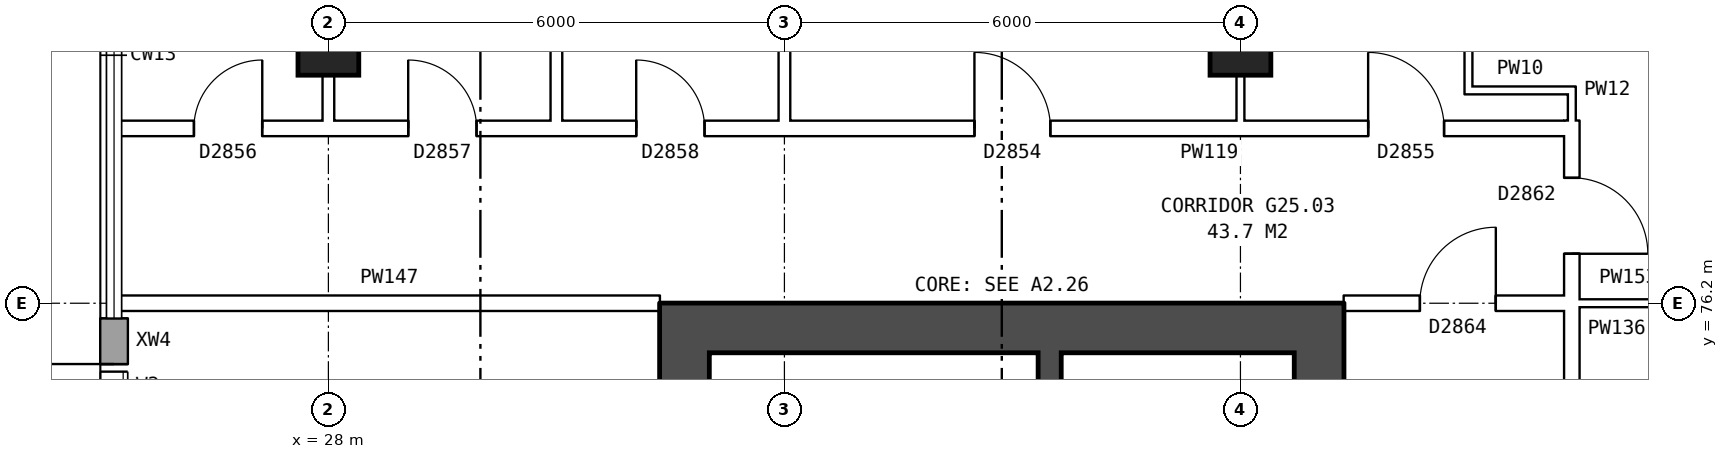
"""IFC4 building model, lengths in metres.
Left out: names, types, materials, properties, quantities, classifications, styles, units other than length and angle.
Written with IfcOpenShell. Run it as: python <this file> out.ifc"""

import sys

from ifc_helpers import new_model, si_unit, direction, frame, frame_2d, origin, origin_2d, place, context, subcontext, project, spatial, rectangle, extrude, element, fill, save


model = new_model("IFC4")
c1 = context("Model", 3, precision=1e-05, world=origin(), true_north=direction((0.0, 1.0)))
c2 = subcontext(c1, "Body", "Model", "MODEL_VIEW")
j1 = project(units=[si_unit("LENGTHUNIT", "METRE"), si_unit("PLANEANGLEUNIT", "RADIAN")], contexts=[c1])
p1 = place(None, origin())
s1 = spatial("IfcSite", under=j1, at=p1, CompositionType="ELEMENT")
p2 = place(p1, origin())
s2 = spatial("IfcBuilding", under=s1, at=p2, CompositionType="ELEMENT")
p3 = place(p2, frame((0.0, 0.0, 90.2)))
s3 = spatial("IfcBuildingStorey", under=s2, at=p3, CompositionType="ELEMENT", Elevation=90.2)
for number, where, z_axis, x_axis in (
    (1, (28.0, 79.6, 0.0), (0.0, 0.0, 1.0), (1.0, 0.0, 0.0)),
    (2, (40.0, 79.6, 0.0), (0.0, 0.0, 1.0), (1.0, 0.0, 0.0)),
):
    element("IfcColumn", number, at=place(p3, frame(where, z_axis=z_axis, x_axis=x_axis)), inside=s3, PredefinedType="COLUMN", context=c2, shape_type="SweptSolid", body=[
        extrude(rectangle(XDim=0.8, YDim=0.8, at=origin_2d()), origin(), (0.0, 0.0, 1.0), 5.6),
    ])
p4 = place(p3, frame((25.18, 76.0, 0.0), z_axis=(0.0, 0.0, 1.0), x_axis=(0.0, -1.0, 0.0)))
e3 = element("IfcWall", 3, at=p4, inside=s3, PredefinedType="STANDARD", context=c2, shape_type="SweptSolid", body=[
    extrude(rectangle(XDim=3.0, YDim=0.36, at=frame_2d((1.5, 0.0))), origin(), (0.0, 0.0, 1.0), 5.6),
])
p5 = place(p4, frame((0.7, 0.0, 3.4)))
e4 = element("IfcOpeningElement", 4, at=p5, cuts=e3, PredefinedType="OPENING", context=c2, shape_type="SweptSolid", body=[
    extrude(rectangle(XDim=1.6, YDim=1.2, at=frame_2d((0.8, 0.6))), frame((0.0, 0.19, 0.0), z_axis=(0.0, -1.0, 0.0), x_axis=(1.0, 0.0, 0.0)), (0.0, 0.0, 1.0), 0.38),
])
p6 = place(p4, frame((0.6, 0.0, 0.0)))
e5 = element("IfcOpeningElement", 5, at=p6, cuts=e3, PredefinedType="OPENING", context=c2, shape_type="SweptSolid", body=[
    extrude(rectangle(XDim=1.8, YDim=2.4, at=frame_2d((0.9, 1.2))), frame((0.0, 0.19, 0.0), z_axis=(0.0, -1.0, 0.0), x_axis=(1.0, 0.0, 0.0)), (0.0, 0.0, 1.0), 0.38),
])
p7 = place(p3, frame((41.035, 75.55, 0.0), z_axis=(0.0, 0.0, 1.0), x_axis=(0.0, -1.0, 0.0)))
e6 = element("IfcWall", 6, at=p7, inside=s3, PredefinedType="SHEAR", context=c2, shape_type="SweptSolid", body=[
    extrude(rectangle(XDim=11.1, YDim=0.65, at=frame_2d((5.55, 0.0))), origin(), (0.0, 0.0, 1.0), 5.6),
])
p8 = place(p7, frame((0.675, 0.0, 0.0)))
e7 = element("IfcOpeningElement", 7, at=p8, cuts=e6, PredefinedType="OPENING", context=c2, shape_type="SweptSolid", body=[
    extrude(rectangle(XDim=1.1, YDim=2.1, at=frame_2d((0.55, 1.05))), frame((0.0, 0.335, 0.0), z_axis=(0.0, -1.0, 0.0), x_axis=(1.0, 0.0, 0.0)), (0.0, 0.0, 1.0), 0.67),
])
p9 = place(p7, frame((2.95, 0.0, 0.0)))
e8 = element("IfcOpeningElement", 8, at=p9, cuts=e6, PredefinedType="OPENING", context=c2, shape_type="SweptSolid", body=[
    extrude(rectangle(XDim=1.1, YDim=2.1, at=frame_2d((0.55, 1.05))), frame((0.0, 0.335, 0.0), z_axis=(0.0, -1.0, 0.0), x_axis=(1.0, 0.0, 0.0)), (0.0, 0.0, 1.0), 0.67),
])
p10 = place(p7, frame((5.15, 0.0, 0.0)))
e9 = element("IfcOpeningElement", 9, at=p10, cuts=e6, PredefinedType="OPENING", context=c2, shape_type="SweptSolid", body=[
    extrude(rectangle(XDim=1.1, YDim=2.1, at=frame_2d((0.55, 1.05))), frame((0.0, 0.335, 0.0), z_axis=(0.0, -1.0, 0.0), x_axis=(1.0, 0.0, 0.0)), (0.0, 0.0, 1.0), 0.67),
])
p11 = place(p7, frame((7.35, 0.0, 0.0)))
e10 = element("IfcOpeningElement", 10, at=p11, cuts=e6, PredefinedType="OPENING", context=c2, shape_type="SweptSolid", body=[
    extrude(rectangle(XDim=1.1, YDim=2.1, at=frame_2d((0.55, 1.05))), frame((0.0, 0.335, 0.0), z_axis=(0.0, -1.0, 0.0), x_axis=(1.0, 0.0, 0.0)), (0.0, 0.0, 1.0), 0.67),
])
p12 = place(p7, frame((9.25, 0.0, 0.0)))
e11 = element("IfcOpeningElement", 11, at=p12, cuts=e6, PredefinedType="OPENING", context=c2, shape_type="SweptSolid", body=[
    extrude(rectangle(XDim=1.1, YDim=2.1, at=frame_2d((0.55, 1.05))), frame((0.0, 0.335, 0.0), z_axis=(0.0, -1.0, 0.0), x_axis=(1.0, 0.0, 0.0)), (0.0, 0.0, 1.0), 0.67),
])
p13 = place(p3, frame((32.685, 75.55, 0.0), z_axis=(0.0, 0.0, 1.0), x_axis=(0.0, -1.0, 0.0)))
e12 = element("IfcWall", 12, at=p13, inside=s3, PredefinedType="SHEAR", context=c2, shape_type="SweptSolid", body=[
    extrude(rectangle(XDim=11.1, YDim=0.65, at=frame_2d((5.55, 0.0))), origin(), (0.0, 0.0, 1.0), 5.6),
])
p14 = place(p3, frame((41.36, 75.875, 0.0), z_axis=(0.0, 0.0, 1.0), x_axis=(-1.0, 0.0, 0.0)))
e13 = element("IfcWall", 13, at=p14, inside=s3, PredefinedType="SHEAR", context=c2, shape_type="SweptSolid", body=[
    extrude(rectangle(XDim=9.0, YDim=0.65, at=frame_2d((4.5, 0.0))), origin(), (0.0, 0.0, 1.0), 5.6),
])
p15 = place(p3, frame((37.49, 75.55, 0.0), z_axis=(0.0, 0.0, 1.0), x_axis=(0.0, -1.0, 0.0)))
e14 = element("IfcWall", 14, at=p15, inside=s3, PredefinedType="SHEAR", context=c2, shape_type="SweptSolid", body=[
    extrude(rectangle(XDim=2.25, YDim=0.3, at=frame_2d((1.125, 0.0))), origin(), (0.0, 0.0, 1.0), 5.6),
])
p16 = place(p3, frame((44.36, 63.9, 0.0), z_axis=(0.0, 0.0, 1.0), x_axis=(0.0, 1.0, 0.0)))
e15 = element("IfcWall", 15, at=p16, inside=s3, PredefinedType="PARTITIONING", context=c2, shape_type="SweptSolid", body=[
    extrude(rectangle(XDim=12.2, YDim=0.2, at=frame_2d((6.1, 0.0))), origin(), (0.0, 0.0, 1.0), 5.6),
])
p17 = place(p16, frame((5.1, 0.0, 0.0)))
e16 = element("IfcOpeningElement", 16, at=p17, cuts=e15, PredefinedType="OPENING", context=c2, shape_type="SweptSolid", body=[
    extrude(rectangle(XDim=2.0, YDim=2.1, at=frame_2d((1.0, 1.05))), frame((0.0, 0.11, 0.0), z_axis=(0.0, -1.0, 0.0), x_axis=(1.0, 0.0, 0.0)), (0.0, 0.0, 1.0), 0.22),
])
p18 = place(p3, frame((25.24, 76.2, 0.0), z_axis=(0.0, 0.0, 1.0), x_axis=(1.0, 0.0, 0.0)))
e17 = element("IfcWall", 17, at=p18, inside=s3, PredefinedType="PARTITIONING", context=c2, shape_type="SweptSolid", body=[
    extrude(rectangle(XDim=7.12, YDim=0.2, at=frame_2d((3.56, 0.0))), origin(), (0.0, 0.0, 1.0), 5.6),
])
p19 = place(p3, frame((41.36, 76.2, 0.0), z_axis=(0.0, 0.0, 1.0), x_axis=(1.0, 0.0, 0.0)))
e18 = element("IfcWall", 18, at=p19, inside=s3, PredefinedType="PARTITIONING", context=c2, shape_type="SweptSolid", body=[
    extrude(rectangle(XDim=3.1, YDim=0.2, at=frame_2d((1.55, 0.0))), origin(), (0.0, 0.0, 1.0), 5.6),
])
p20 = place(p19, frame((1.0, 0.0, 0.0)))
e19 = element("IfcOpeningElement", 19, at=p20, cuts=e18, PredefinedType="OPENING", context=c2, shape_type="SweptSolid", body=[
    extrude(rectangle(XDim=1.0, YDim=2.1, at=frame_2d((0.5, 1.05))), frame((0.0, 0.11, 0.0), z_axis=(0.0, -1.0, 0.0), x_axis=(1.0, 0.0, 0.0)), (0.0, 0.0, 1.0), 0.22),
])
p21 = place(p3, frame((44.26, 76.2, 0.0), z_axis=(0.0, 0.0, 1.0), x_axis=(1.0, 0.0, 0.0)))
e20 = element("IfcWall", 20, at=p21, inside=s3, PredefinedType="PARTITIONING", context=c2, shape_type="SweptSolid", body=[
    extrude(rectangle(XDim=19.38, YDim=0.1, at=frame_2d((9.69, 0.0))), origin(), (0.0, 0.0, 1.0), 5.6),
])
p22 = place(p21, frame((4.42, 0.0, 0.0)))
e21 = element("IfcOpeningElement", 21, at=p22, cuts=e20, PredefinedType="OPENING", context=c2, shape_type="SweptSolid", body=[
    extrude(rectangle(XDim=1.0, YDim=2.1, at=frame_2d((0.5, 1.05))), frame((0.0, 0.06, 0.0), z_axis=(0.0, -1.0, 0.0), x_axis=(1.0, 0.0, 0.0)), (0.0, 0.0, 1.0), 0.12),
])
p23 = place(p21, frame((14.06, 0.0, 0.0)))
e22 = element("IfcOpeningElement", 22, at=p23, cuts=e20, PredefinedType="OPENING", context=c2, shape_type="SweptSolid", body=[
    extrude(rectangle(XDim=1.0, YDim=2.1, at=frame_2d((0.5, 1.05))), frame((0.0, 0.06, 0.0), z_axis=(0.0, -1.0, 0.0), x_axis=(1.0, 0.0, 0.0)), (0.0, 0.0, 1.0), 0.12),
])
p24 = place(p3, frame((25.24, 78.5, 0.0), z_axis=(0.0, 0.0, 1.0), x_axis=(1.0, 0.0, 0.0)))
e23 = element("IfcWall", 23, at=p24, inside=s3, PredefinedType="PARTITIONING", context=c2, shape_type="SweptSolid", body=[
    extrude(rectangle(XDim=19.22, YDim=0.2, at=frame_2d((9.61, 0.0))), origin(), (0.0, 0.0, 1.0), 5.6),
])
p25 = place(p24, frame((0.99, 0.0, 0.0)))
e24 = element("IfcOpeningElement", 24, at=p25, cuts=e23, PredefinedType="OPENING", context=c2, shape_type="SweptSolid", body=[
    extrude(rectangle(XDim=0.9, YDim=2.1, at=frame_2d((0.45, 1.05))), frame((0.0, 0.11, 0.0), z_axis=(0.0, -1.0, 0.0), x_axis=(1.0, 0.0, 0.0)), (0.0, 0.0, 1.0), 0.22),
])
p26 = place(p24, frame((3.81, 0.0, 0.0)))
e25 = element("IfcOpeningElement", 25, at=p26, cuts=e23, PredefinedType="OPENING", context=c2, shape_type="SweptSolid", body=[
    extrude(rectangle(XDim=0.9, YDim=2.1, at=frame_2d((0.45, 1.05))), frame((0.0, 0.11, 0.0), z_axis=(0.0, -1.0, 0.0), x_axis=(1.0, 0.0, 0.0)), (0.0, 0.0, 1.0), 0.22),
])
p27 = place(p24, frame((6.81, 0.0, 0.0)))
e26 = element("IfcOpeningElement", 26, at=p27, cuts=e23, PredefinedType="OPENING", context=c2, shape_type="SweptSolid", body=[
    extrude(rectangle(XDim=0.9, YDim=2.1, at=frame_2d((0.45, 1.05))), frame((0.0, 0.11, 0.0), z_axis=(0.0, -1.0, 0.0), x_axis=(1.0, 0.0, 0.0)), (0.0, 0.0, 1.0), 0.22),
])
p28 = place(p24, frame((11.26, 0.0, 0.0)))
e27 = element("IfcOpeningElement", 27, at=p28, cuts=e23, PredefinedType="OPENING", context=c2, shape_type="SweptSolid", body=[
    extrude(rectangle(XDim=1.0, YDim=2.1, at=frame_2d((0.5, 1.05))), frame((0.0, 0.11, 0.0), z_axis=(0.0, -1.0, 0.0), x_axis=(1.0, 0.0, 0.0)), (0.0, 0.0, 1.0), 0.22),
])
p29 = place(p24, frame((16.44, 0.0, 0.0)))
e28 = element("IfcOpeningElement", 28, at=p29, cuts=e23, PredefinedType="OPENING", context=c2, shape_type="SweptSolid", body=[
    extrude(rectangle(XDim=1.0, YDim=2.1, at=frame_2d((0.5, 1.05))), frame((0.0, 0.11, 0.0), z_axis=(0.0, -1.0, 0.0), x_axis=(1.0, 0.0, 0.0)), (0.0, 0.0, 1.0), 0.22),
])
p30 = place(p3, frame((42.95, 79.0, 0.0), z_axis=(0.0, 0.0, 1.0), x_axis=(1.0, 0.0, 0.0)))
e29 = element("IfcWall", 29, at=p30, inside=s3, PredefinedType="PARTITIONING", context=c2, shape_type="SweptSolid", body=[
    extrude(rectangle(XDim=1.46, YDim=0.1, at=frame_2d((0.73, 0.0))), origin(), (0.0, 0.0, 1.0), 5.6),
])
p31 = place(p3, frame((28.0, 78.4, 0.0), z_axis=(0.0, 0.0, 1.0), x_axis=(0.0, 1.0, 0.0)))
e30 = element("IfcWall", 30, at=p31, inside=s3, PredefinedType="PLUMBINGWALL", context=c2, shape_type="SweptSolid", body=[
    extrude(rectangle(XDim=7.211, YDim=0.15, at=frame_2d((3.605, 0.0))), origin(), (0.0, 0.0, 1.0), 5.6),
])
for number, where, z_axis, x_axis in (
    (31, (31.0, 78.4, 0.0), (0.0, 0.0, 1.0), (0.0, 1.0, 0.0)),
    (32, (34.0, 78.4, 0.0), (0.0, 0.0, 1.0), (0.0, 1.0, 0.0)),
):
    element("IfcWall", number, at=place(p3, frame(where, z_axis=z_axis, x_axis=x_axis)), inside=s3, PredefinedType="PLUMBINGWALL", context=c2, shape_type="SweptSolid", body=[
        extrude(rectangle(XDim=7.36, YDim=0.15, at=frame_2d((3.68, 0.0))), origin(), (0.0, 0.0, 1.0), 5.6),
    ])
p32 = place(p3, frame((40.0, 78.4, 0.0), z_axis=(0.0, 0.0, 1.0), x_axis=(0.0, 1.0, 0.0)))
e33 = element("IfcWall", 33, at=p32, inside=s3, PredefinedType="PARTITIONING", context=c2, shape_type="SweptSolid", body=[
    extrude(rectangle(XDim=7.36, YDim=0.1, at=frame_2d((3.68, 0.0))), origin(), (0.0, 0.0, 1.0), 5.6),
])
p33 = place(p3, frame((43.0, 78.95, 0.0), z_axis=(0.0, 0.0, 1.0), x_axis=(0.0, 1.0, 0.0)))
e34 = element("IfcWall", 34, at=p33, inside=s3, PredefinedType="PARTITIONING", context=c2, shape_type="SweptSolid", body=[
    extrude(rectangle(XDim=6.81, YDim=0.1, at=frame_2d((3.405, 0.0))), origin(), (0.0, 0.0, 1.0), 5.6),
])
p34 = place(p3, frame((44.36, 76.1, 0.0), z_axis=(0.0, 0.0, 1.0), x_axis=(0.0, 1.0, 0.0)))
e35 = element("IfcWall", 35, at=p34, inside=s3, PredefinedType="PARTITIONING", context=c2, shape_type="SweptSolid", body=[
    extrude(rectangle(XDim=2.502, YDim=0.2, at=frame_2d((1.251, 0.0))), origin(), (0.0, 0.0, 1.0), 5.6),
])
p35 = place(p34, frame((0.751, 0.0, 0.0)))
e36 = element("IfcOpeningElement", 36, at=p35, cuts=e35, PredefinedType="OPENING", context=c2, shape_type="SweptSolid", body=[
    extrude(rectangle(XDim=1.0, YDim=2.1, at=frame_2d((0.5, 1.05))), frame((0.0, 0.11, 0.0), z_axis=(0.0, -1.0, 0.0), x_axis=(1.0, 0.0, 0.0)), (0.0, 0.0, 1.0), 0.22),
])
p36 = place(p3, frame((44.36, 78.398, 0.0), z_axis=(0.0, 0.0, 1.0), x_axis=(0.0, 1.0, 0.0)))
e37 = element("IfcWall", 37, at=p36, inside=s3, PredefinedType="PARTITIONING", context=c2, shape_type="SweptSolid", body=[
    extrude(rectangle(XDim=0.652, YDim=0.1, at=frame_2d((0.326, 0.0))), origin(), (0.0, 0.0, 1.0), 5.6),
])
p37 = place(p5, origin())
e38 = element("IfcWindow", 38, at=p37, inside=s3, PartitioningType="DOUBLE_PANEL_HORIZONTAL", PredefinedType="WINDOW", context=c2, shape_type="SweptSolid", body=[
    extrude(rectangle(XDim=1.6, YDim=1.2, at=frame_2d((0.8, 0.6))), frame((0.0, 0.15, 0.0), z_axis=(0.0, -1.0, 0.0), x_axis=(1.0, 0.0, 0.0)), (0.0, 0.0, 1.0), 0.06),
])
fill(e4, e38)
p38 = place(p6, frame((1.8, 0.0, 0.0), z_axis=(0.0, 0.0, 1.0), x_axis=(-1.0, 0.0, 0.0)))
e39 = element("IfcDoor", 39, at=p38, inside=s3, OperationType="DOUBLE_DOOR_SINGLE_SWING", PredefinedType="DOOR", context=c2, shape_type="SweptSolid", body=[
    extrude(rectangle(XDim=1.8, YDim=2.4, at=frame_2d((0.9, 1.2))), frame((0.0, 0.025, 0.0), z_axis=(0.0, -1.0, 0.0), x_axis=(1.0, 0.0, 0.0)), (0.0, 0.0, 1.0), 0.05),
])
fill(e5, e39)
p39 = place(p20, origin())
e40 = element("IfcDoor", 40, at=p39, inside=s3, OperationType="SINGLE_SWING_RIGHT", PredefinedType="DOOR", context=c2, shape_type="SweptSolid", body=[
    extrude(rectangle(XDim=1.0, YDim=2.1, at=frame_2d((0.5, 1.05))), frame((0.0, 0.025, 0.0), z_axis=(0.0, -1.0, 0.0), x_axis=(1.0, 0.0, 0.0)), (0.0, 0.0, 1.0), 0.05),
])
fill(e19, e40)
p40 = place(p25, origin())
e41 = element("IfcDoor", 41, at=p40, inside=s3, OperationType="SINGLE_SWING_RIGHT", PredefinedType="DOOR", context=c2, shape_type="SweptSolid", body=[
    extrude(rectangle(XDim=0.9, YDim=2.1, at=frame_2d((0.45, 1.05))), frame((0.0, 0.025, 0.0), z_axis=(0.0, -1.0, 0.0), x_axis=(1.0, 0.0, 0.0)), (0.0, 0.0, 1.0), 0.05),
])
fill(e24, e41)
p41 = place(p26, origin())
e42 = element("IfcDoor", 42, at=p41, inside=s3, OperationType="SINGLE_SWING_LEFT", PredefinedType="DOOR", context=c2, shape_type="SweptSolid", body=[
    extrude(rectangle(XDim=0.9, YDim=2.1, at=frame_2d((0.45, 1.05))), frame((0.0, 0.025, 0.0), z_axis=(0.0, -1.0, 0.0), x_axis=(1.0, 0.0, 0.0)), (0.0, 0.0, 1.0), 0.05),
])
fill(e25, e42)
p42 = place(p27, origin())
e43 = element("IfcDoor", 43, at=p42, inside=s3, OperationType="SINGLE_SWING_LEFT", PredefinedType="DOOR", context=c2, shape_type="SweptSolid", body=[
    extrude(rectangle(XDim=0.9, YDim=2.1, at=frame_2d((0.45, 1.05))), frame((0.0, 0.025, 0.0), z_axis=(0.0, -1.0, 0.0), x_axis=(1.0, 0.0, 0.0)), (0.0, 0.0, 1.0), 0.05),
])
fill(e26, e43)
p43 = place(p28, origin())
e44 = element("IfcDoor", 44, at=p43, inside=s3, OperationType="SINGLE_SWING_LEFT", PredefinedType="DOOR", context=c2, shape_type="SweptSolid", body=[
    extrude(rectangle(XDim=1.0, YDim=2.1, at=frame_2d((0.5, 1.05))), frame((0.0, 0.025, 0.0), z_axis=(0.0, -1.0, 0.0), x_axis=(1.0, 0.0, 0.0)), (0.0, 0.0, 1.0), 0.05),
])
fill(e27, e44)
p44 = place(p29, origin())
e45 = element("IfcDoor", 45, at=p44, inside=s3, OperationType="SINGLE_SWING_LEFT", PredefinedType="DOOR", context=c2, shape_type="SweptSolid", body=[
    extrude(rectangle(XDim=1.0, YDim=2.1, at=frame_2d((0.5, 1.05))), frame((0.0, 0.025, 0.0), z_axis=(0.0, -1.0, 0.0), x_axis=(1.0, 0.0, 0.0)), (0.0, 0.0, 1.0), 0.05),
])
fill(e28, e45)
p45 = place(p35, frame((1.0, 0.0, 0.0), z_axis=(0.0, 0.0, 1.0), x_axis=(-1.0, 0.0, 0.0)))
e46 = element("IfcDoor", 46, at=p45, inside=s3, OperationType="SINGLE_SWING_RIGHT", PredefinedType="DOOR", context=c2, shape_type="SweptSolid", body=[
    extrude(rectangle(XDim=1.0, YDim=2.1, at=frame_2d((0.5, 1.05))), frame((0.0, 0.025, 0.0), z_axis=(0.0, -1.0, 0.0), x_axis=(1.0, 0.0, 0.0)), (0.0, 0.0, 1.0), 0.05),
])
fill(e36, e46)
save(model, sys.argv[1])
